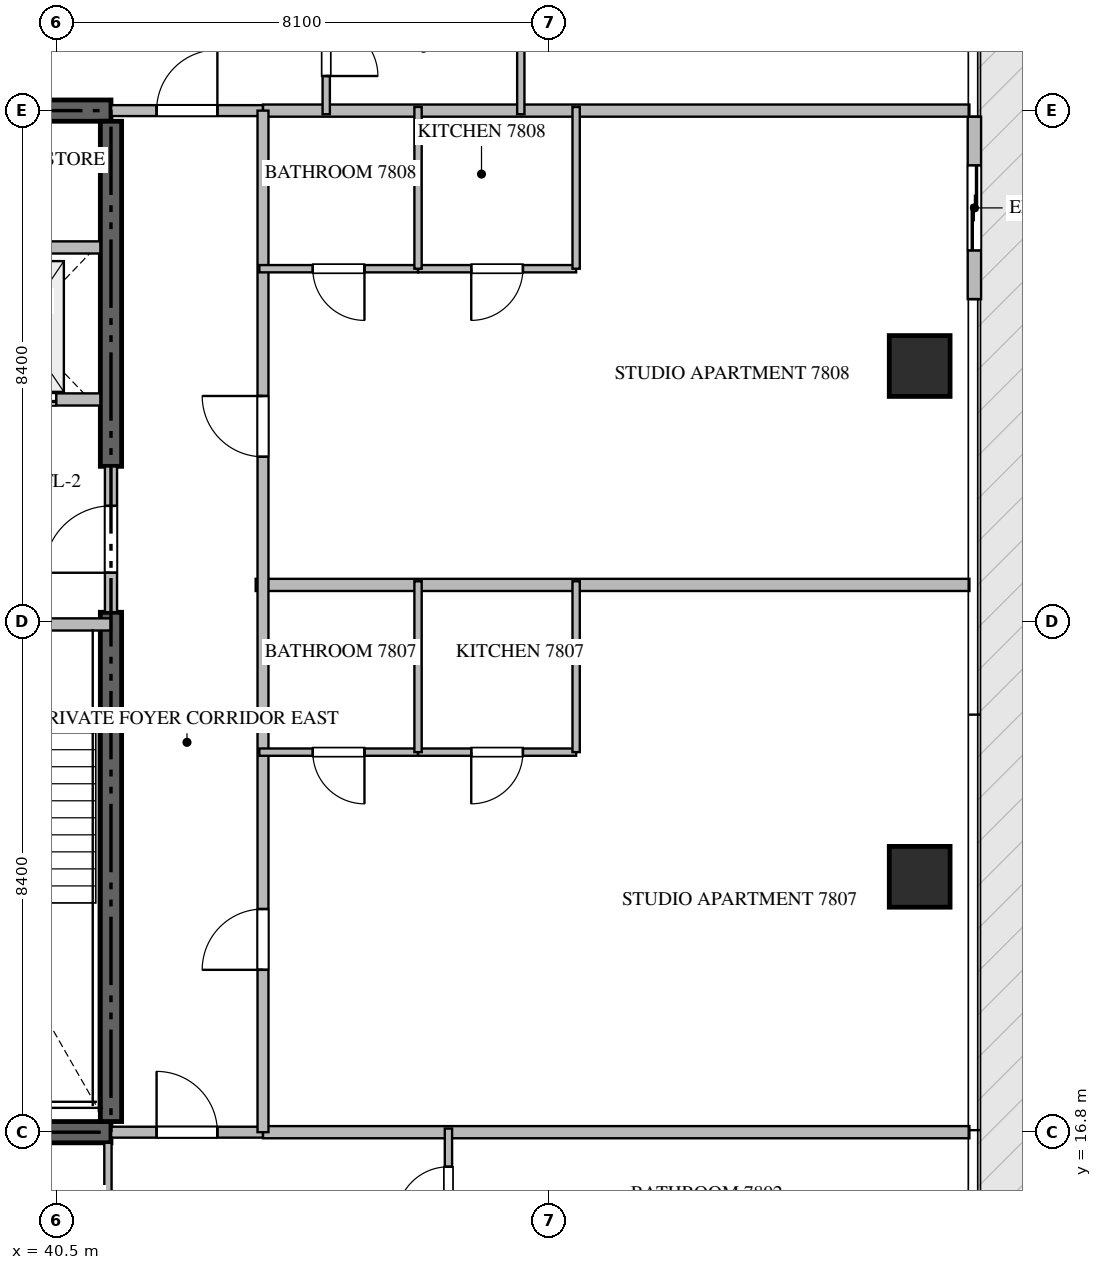
"""IFC4 building model, lengths in metres.
Left out: names, types, materials, properties, quantities, classifications, styles, units other than length and angle.
Written with IfcOpenShell. Run it as: python <this file> out.ifc"""

import sys

from ifc_helpers import new_model, si_unit, direction, frame, frame_2d, origin, origin_2d, place, context, subcontext, project, spatial, rectangle, extrude, source, transform, mapped, element, fill, save


model = new_model("IFC4")
c1 = context("Model", 3, precision=1e-05, world=origin(), true_north=direction((0.0, 1.0)))
c2 = subcontext(c1, "Body", "Model", "MODEL_VIEW")
j1 = project(units=[si_unit("LENGTHUNIT", "METRE"), si_unit("PLANEANGLEUNIT", "RADIAN")], contexts=[c1])
p1 = place(None, origin())
s1 = spatial("IfcSite", under=j1, at=p1, CompositionType="ELEMENT")
p2 = place(p1, origin())
s2 = spatial("IfcBuilding", under=s1, at=p2, CompositionType="ELEMENT")
p3 = place(p2, frame((0.0, 0.0, 313.7)))
s3 = spatial("IfcBuildingStorey", under=s2, at=p3, CompositionType="ELEMENT", Elevation=313.7)
for number, where, z_axis, x_axis in (
    (1, (23.4, 16.8, -0.26), (0.0, 0.0, 1.0), (1.0, 0.0, 0.0)),
    (2, (41.4, 33.6, -0.26), (0.0, 0.0, 1.0), (-1.0, 0.0, 0.0)),
):
    element("IfcWall", number, at=place(p3, frame(where, z_axis=z_axis, x_axis=x_axis)), inside=s3, PredefinedType="SHEAR", context=c2, shape_type="SweptSolid", body=[
        extrude(rectangle(XDim=18.0, YDim=0.35, at=frame_2d((9.0, 0.0))), origin(), (0.0, 0.0, 1.0), 4.048),
    ])
p4 = place(p3, frame((41.4, 16.975, -0.26), z_axis=(0.0, 0.0, 1.0), x_axis=(0.0, 1.0, 0.0)))
e3 = element("IfcWall", 3, at=p4, inside=s3, PredefinedType="SHEAR", context=c2, shape_type="SweptSolid", body=[
    extrude(rectangle(XDim=8.375, YDim=0.35, at=frame_2d((4.188, 0.0))), origin(), (0.0, 0.0, 1.0), 4.048),
])
p5 = place(p3, frame((41.4, 27.75, -0.26), z_axis=(0.0, 0.0, 1.0), x_axis=(0.0, 1.0, 0.0)))
e4 = element("IfcWall", 4, at=p5, inside=s3, PredefinedType="SHEAR", context=c2, shape_type="SweptSolid", body=[
    extrude(rectangle(XDim=5.675, YDim=0.35, at=frame_2d((2.837, 0.0))), origin(), (0.0, 0.0, 1.0), 4.048),
])
m1 = source(origin(), c2, "Body", "SweptSolid", [
    extrude(rectangle(XDim=1.0, YDim=1.0, at=origin_2d()), origin(), (0.0, 0.0, 1.0), 4.05),
])
for number, where, z_axis, x_axis in (
    (5, (54.7, 21.0, -0.26), (0.0, 0.0, 1.0), (1.0, 0.0, 0.0)),
    (6, (54.7, 29.4, -0.26), (0.0, 0.0, 1.0), (1.0, 0.0, 0.0)),
):
    element("IfcColumn", number, at=place(p3, frame(where, z_axis=z_axis, x_axis=x_axis)), inside=s3, PredefinedType="COLUMN", context=c2, shape_type="MappedRepresentation", body=[
        mapped(m1, transform((0.0, 0.0, 0.0), scale=1.0)),
    ])
p6 = place(p3, frame((55.6, 30.5, 0.0), z_axis=(0.0, 0.0, 1.0), x_axis=(0.0, 1.0, 0.0)))
e7 = element("IfcWall", 7, at=p6, inside=s3, PredefinedType="ELEMENTEDWALL", context=c2, shape_type="SweptSolid", body=[
    extrude(rectangle(XDim=3.0, YDim=0.22, at=frame_2d((1.5, 0.0))), origin(), (0.0, 0.0, 1.0), 3.775),
])
p7 = place(p6, frame((0.8, 0.0, 0.0)))
e8 = element("IfcOpeningElement", 8, at=p7, cuts=e7, PredefinedType="OPENING", context=c2, shape_type="SweptSolid", body=[
    extrude(rectangle(XDim=1.4, YDim=2.25, at=frame_2d((0.7, 1.125))), frame((0.0, 0.12, 0.0), z_axis=(0.0, -1.0, 0.0), x_axis=(1.0, 0.0, 0.0)), (0.0, 0.0, 1.0), 0.24),
])
p8 = place(p3, frame((36.95, 25.15, 0.0), z_axis=(0.0, 0.0, 1.0), x_axis=(1.0, 0.0, 0.0)))
e9 = element("IfcWall", 9, at=p8, inside=s3, PredefinedType="STANDARD", context=c2, shape_type="SweptSolid", body=[
    extrude(rectangle(XDim=4.45, YDim=0.2, at=frame_2d((2.225, 0.0))), origin(), (0.0, 0.0, 1.0), 3.79),
])
p9 = place(p8, frame((1.65, 0.0, 0.0)))
e10 = element("IfcOpeningElement", 10, at=p9, cuts=e9, PredefinedType="OPENING", context=c2, shape_type="SweptSolid", body=[
    extrude(rectangle(XDim=1.1, YDim=2.15, at=frame_2d((0.55, 1.075))), frame((0.0, 0.11, 0.0), z_axis=(0.0, -1.0, 0.0), x_axis=(1.0, 0.0, 0.0)), (0.0, 0.0, 1.0), 0.22),
])
p10 = place(p3, frame((38.75, 28.85, 0.0), z_axis=(0.0, 0.0, 1.0), x_axis=(1.0, 0.0, 0.0)))
e11 = element("IfcWall", 11, at=p10, inside=s3, PredefinedType="STANDARD", context=c2, shape_type="SweptSolid", body=[
    extrude(rectangle(XDim=2.475, YDim=0.2, at=frame_2d((1.238, 0.0))), origin(), (0.0, 0.0, 1.0), 3.79),
])
p11 = place(p10, frame((0.55, 0.0, 0.0)))
e12 = element("IfcOpeningElement", 12, at=p11, cuts=e11, PredefinedType="OPENING", context=c2, shape_type="SweptSolid", body=[
    extrude(rectangle(XDim=1.2, YDim=2.2, at=frame_2d((0.6, 1.1))), frame((0.0, 0.11, 0.0), z_axis=(0.0, -1.0, 0.0), x_axis=(1.0, 0.0, 0.0)), (0.0, 0.0, 1.0), 0.22),
])
p12 = place(p3, frame((38.75, 31.35, 0.0), z_axis=(0.0, 0.0, 1.0), x_axis=(1.0, 0.0, 0.0)))
e13 = element("IfcWall", 13, at=p12, inside=s3, PredefinedType="STANDARD", context=c2, shape_type="SweptSolid", body=[
    extrude(rectangle(XDim=2.475, YDim=0.2, at=frame_2d((1.238, 0.0))), origin(), (0.0, 0.0, 1.0), 3.79),
])
p13 = place(p3, frame((41.4, 25.352, 0.0), z_axis=(0.0, 0.0, 1.0), x_axis=(0.0, 1.0, 0.0)))
e14 = element("IfcWall", 14, at=p13, inside=s3, PredefinedType="STANDARD", context=c2, shape_type="SweptSolid", body=[
    extrude(rectangle(XDim=2.396, YDim=0.2, at=frame_2d((1.198, 0.0))), origin(), (0.0, 0.0, 1.0), 3.79),
])
p14 = place(p13, frame((0.648, 0.0, 0.0)))
e15 = element("IfcOpeningElement", 15, at=p14, cuts=e14, PredefinedType="OPENING", context=c2, shape_type="SweptSolid", body=[
    extrude(rectangle(XDim=1.1, YDim=2.15, at=frame_2d((0.55, 1.075))), frame((0.0, 0.11, 0.0), z_axis=(0.0, -1.0, 0.0), x_axis=(1.0, 0.0, 0.0)), (0.0, 0.0, 1.0), 0.22),
])
p15 = place(p3, frame((43.78, 25.8, 0.0), z_axis=(0.0, 0.0, 1.0), x_axis=(1.0, 0.0, 0.0)))
e16 = element("IfcWall", 16, at=p15, inside=s3, PredefinedType="PARTITIONING", context=c2, shape_type="SweptSolid", body=[
    extrude(rectangle(XDim=11.738, YDim=0.2, at=frame_2d((5.869, 0.0))), origin(), (0.0, 0.0, 1.0), 3.79),
])
for number, where, z_axis, x_axis in (
    (17, (43.9, 16.8, 0.0), (0.0, 0.0, 1.0), (1.0, 0.0, 0.0)),
    (18, (43.9, 33.6, 0.0), (0.0, 0.0, 1.0), (1.0, 0.0, 0.0)),
):
    element("IfcWall", number, at=place(p3, frame(where, z_axis=z_axis, x_axis=x_axis)), inside=s3, PredefinedType="PARTITIONING", context=c2, shape_type="SweptSolid", body=[
        extrude(rectangle(XDim=11.618, YDim=0.2, at=frame_2d((5.809, 0.0))), origin(), (0.0, 0.0, 1.0), 3.79),
    ])
p16 = place(p3, frame((41.402, 16.8, 0.0), z_axis=(0.0, 0.0, 1.0), x_axis=(1.0, 0.0, 0.0)))
e19 = element("IfcWall", 19, at=p16, inside=s3, PredefinedType="PARTITIONING", context=c2, shape_type="SweptSolid", body=[
    extrude(rectangle(XDim=2.496, YDim=0.18, at=frame_2d((1.248, 0.0))), origin(), (0.0, 0.0, 1.0), 3.79),
])
p17 = place(p16, frame((0.748, 0.0, 0.0)))
e20 = element("IfcOpeningElement", 20, at=p17, cuts=e19, PredefinedType="OPENING", context=c2, shape_type="SweptSolid", body=[
    extrude(rectangle(XDim=1.0, YDim=2.15, at=frame_2d((0.5, 1.075))), frame((0.0, 0.1, 0.0), z_axis=(0.0, -1.0, 0.0), x_axis=(1.0, 0.0, 0.0)), (0.0, 0.0, 1.0), 0.2),
])
p18 = place(p3, frame((41.402, 33.6, 0.0), z_axis=(0.0, 0.0, 1.0), x_axis=(1.0, 0.0, 0.0)))
e21 = element("IfcWall", 21, at=p18, inside=s3, PredefinedType="PARTITIONING", context=c2, shape_type="SweptSolid", body=[
    extrude(rectangle(XDim=2.496, YDim=0.18, at=frame_2d((1.248, 0.0))), origin(), (0.0, 0.0, 1.0), 3.79),
])
p19 = place(p18, frame((0.748, 0.0, 0.0)))
e22 = element("IfcOpeningElement", 22, at=p19, cuts=e21, PredefinedType="OPENING", context=c2, shape_type="SweptSolid", body=[
    extrude(rectangle(XDim=1.0, YDim=2.15, at=frame_2d((0.5, 1.075))), frame((0.0, 0.1, 0.0), z_axis=(0.0, -1.0, 0.0), x_axis=(1.0, 0.0, 0.0)), (0.0, 0.0, 1.0), 0.2),
])
p20 = place(p3, frame((43.9, 16.8, 0.0), z_axis=(0.0, 0.0, 1.0), x_axis=(0.0, 1.0, 0.0)))
e23 = element("IfcWall", 23, at=p20, inside=s3, PredefinedType="PARTITIONING", context=c2, shape_type="SweptSolid", body=[
    extrude(rectangle(XDim=16.8, YDim=0.18, at=frame_2d((8.4, 0.0))), origin(), (0.0, 0.0, 1.0), 3.79),
])
p21 = place(p20, frame((2.67, 0.0, 0.0)))
e24 = element("IfcOpeningElement", 24, at=p21, cuts=e23, PredefinedType="OPENING", context=c2, shape_type="SweptSolid", body=[
    extrude(rectangle(XDim=1.0, YDim=2.15, at=frame_2d((0.5, 1.075))), frame((0.0, 0.1, 0.0), z_axis=(0.0, -1.0, 0.0), x_axis=(1.0, 0.0, 0.0)), (0.0, 0.0, 1.0), 0.2),
])
p22 = place(p20, frame((11.107, 0.0, 0.0)))
e25 = element("IfcOpeningElement", 25, at=p22, cuts=e23, PredefinedType="OPENING", context=c2, shape_type="SweptSolid", body=[
    extrude(rectangle(XDim=1.0, YDim=2.15, at=frame_2d((0.5, 1.075))), frame((0.0, 0.1, 0.0), z_axis=(0.0, -1.0, 0.0), x_axis=(1.0, 0.0, 0.0)), (0.0, 0.0, 1.0), 0.2),
])
p23 = place(p3, frame((41.35, 14.05, 0.0), z_axis=(0.0, 0.0, 1.0), x_axis=(0.0, 1.0, 0.0)))
e26 = element("IfcWall", 26, at=p23, inside=s3, PredefinedType="PARTITIONING", context=c2, shape_type="SweptSolid", body=[
    extrude(rectangle(XDim=2.575, YDim=0.12, at=frame_2d((1.288, 0.0))), origin(), (0.0, 0.0, 1.0), 3.79),
])
p24 = place(p3, frame((46.95, 14.752, 0.0), z_axis=(0.0, 0.0, 1.0), x_axis=(0.0, 1.0, 0.0)))
e27 = element("IfcWall", 27, at=p24, inside=s3, PredefinedType="PARTITIONING", context=c2, shape_type="SweptSolid", body=[
    extrude(rectangle(XDim=2.108, YDim=0.12, at=frame_2d((1.054, 0.0))), origin(), (0.0, 0.0, 1.0), 3.372),
])
p25 = place(p24, frame((0.629, 0.0, 0.0)))
e28 = element("IfcOpeningElement", 28, at=p25, cuts=e27, PredefinedType="OPENING", context=c2, shape_type="SweptSolid", body=[
    extrude(rectangle(XDim=0.85, YDim=2.1, at=frame_2d((0.425, 1.05))), frame((0.0, 0.07, 0.0), z_axis=(0.0, -1.0, 0.0), x_axis=(1.0, 0.0, 0.0)), (0.0, 0.0, 1.0), 0.14),
])
p26 = place(p3, frame((48.14, 35.65, 0.0), z_axis=(0.0, 0.0, 1.0), x_axis=(0.0, -1.0, 0.0)))
e29 = element("IfcWall", 29, at=p26, inside=s3, PredefinedType="PARTITIONING", context=c2, shape_type="SweptSolid", body=[
    extrude(rectangle(XDim=2.11, YDim=0.12, at=frame_2d((1.055, 0.0))), origin(), (0.0, 0.0, 1.0), 3.79),
])
p27 = place(p3, frame((44.94, 35.648, 0.0), z_axis=(0.0, 0.0, 1.0), x_axis=(0.0, -1.0, 0.0)))
e30 = element("IfcWall", 30, at=p27, inside=s3, PredefinedType="PARTITIONING", context=c2, shape_type="SweptSolid", body=[
    extrude(rectangle(XDim=2.108, YDim=0.12, at=frame_2d((1.054, 0.0))), origin(), (0.0, 0.0, 1.0), 3.79),
])
p28 = place(p27, frame((0.629, 0.0, 0.0)))
e31 = element("IfcOpeningElement", 31, at=p28, cuts=e30, PredefinedType="OPENING", context=c2, shape_type="SweptSolid", body=[
    extrude(rectangle(XDim=0.85, YDim=2.1, at=frame_2d((0.425, 1.05))), frame((0.0, 0.07, 0.0), z_axis=(0.0, -1.0, 0.0), x_axis=(1.0, 0.0, 0.0)), (0.0, 0.0, 1.0), 0.14),
])
p29 = place(p3, frame((49.05, 23.05, 0.0), z_axis=(0.0, 0.0, 1.0), x_axis=(-1.0, 0.0, 0.0)))
e32 = element("IfcWall", 32, at=p29, inside=s3, PredefinedType="PARTITIONING", context=c2, shape_type="SweptSolid", body=[
    extrude(rectangle(XDim=2.6, YDim=0.12, at=frame_2d((1.3, 0.0))), origin(), (0.0, 0.0, 1.0), 3.79),
])
p30 = place(p29, frame((0.875, 0.0, 0.0)))
e33 = element("IfcOpeningElement", 33, at=p30, cuts=e32, PredefinedType="OPENING", context=c2, shape_type="SweptSolid", body=[
    extrude(rectangle(XDim=0.85, YDim=2.1, at=frame_2d((0.425, 1.05))), frame((0.0, 0.07, 0.0), z_axis=(0.0, -1.0, 0.0), x_axis=(1.0, 0.0, 0.0)), (0.0, 0.0, 1.0), 0.14),
])
p31 = place(p3, frame((46.448, 23.05, 0.0), z_axis=(0.0, 0.0, 1.0), x_axis=(-1.0, 0.0, 0.0)))
e34 = element("IfcWall", 34, at=p31, inside=s3, PredefinedType="PARTITIONING", context=c2, shape_type="SweptSolid", body=[
    extrude(rectangle(XDim=2.608, YDim=0.12, at=frame_2d((1.304, 0.0))), origin(), (0.0, 0.0, 1.0), 3.79),
])
p32 = place(p31, frame((0.879, 0.0, 0.0)))
e35 = element("IfcOpeningElement", 35, at=p32, cuts=e34, PredefinedType="OPENING", context=c2, shape_type="SweptSolid", body=[
    extrude(rectangle(XDim=0.85, YDim=2.1, at=frame_2d((0.425, 1.05))), frame((0.0, 0.07, 0.0), z_axis=(0.0, -1.0, 0.0), x_axis=(1.0, 0.0, 0.0)), (0.0, 0.0, 1.0), 0.14),
])
for number, where, z_axis, x_axis in (
    (36, (46.45, 23.05, 0.0), (0.0, 0.0, 1.0), (0.0, 1.0, 0.0)),
    (37, (49.05, 23.05, 0.0), (0.0, 0.0, 1.0), (0.0, 1.0, 0.0)),
):
    element("IfcWall", number, at=place(p3, frame(where, z_axis=z_axis, x_axis=x_axis)), inside=s3, PredefinedType="PARTITIONING", context=c2, shape_type="SweptSolid", body=[
        extrude(rectangle(XDim=2.81, YDim=0.12, at=frame_2d((1.405, 0.0))), origin(), (0.0, 0.0, 1.0), 3.79),
    ])
p33 = place(p3, frame((49.05, 31.0, 0.0), z_axis=(0.0, 0.0, 1.0), x_axis=(-1.0, 0.0, 0.0)))
e38 = element("IfcWall", 38, at=p33, inside=s3, PredefinedType="PARTITIONING", context=c2, shape_type="SweptSolid", body=[
    extrude(rectangle(XDim=2.6, YDim=0.12, at=frame_2d((1.3, 0.0))), origin(), (0.0, 0.0, 1.0), 3.79),
])
p34 = place(p33, frame((0.875, 0.0, 0.0)))
e39 = element("IfcOpeningElement", 39, at=p34, cuts=e38, PredefinedType="OPENING", context=c2, shape_type="SweptSolid", body=[
    extrude(rectangle(XDim=0.85, YDim=2.1, at=frame_2d((0.425, 1.05))), frame((0.0, 0.07, 0.0), z_axis=(0.0, -1.0, 0.0), x_axis=(1.0, 0.0, 0.0)), (0.0, 0.0, 1.0), 0.14),
])
p35 = place(p3, frame((46.448, 31.0, 0.0), z_axis=(0.0, 0.0, 1.0), x_axis=(-1.0, 0.0, 0.0)))
e40 = element("IfcWall", 40, at=p35, inside=s3, PredefinedType="PARTITIONING", context=c2, shape_type="SweptSolid", body=[
    extrude(rectangle(XDim=2.608, YDim=0.12, at=frame_2d((1.304, 0.0))), origin(), (0.0, 0.0, 1.0), 3.79),
])
p36 = place(p35, frame((0.879, 0.0, 0.0)))
e41 = element("IfcOpeningElement", 41, at=p36, cuts=e40, PredefinedType="OPENING", context=c2, shape_type="SweptSolid", body=[
    extrude(rectangle(XDim=0.85, YDim=2.1, at=frame_2d((0.425, 1.05))), frame((0.0, 0.07, 0.0), z_axis=(0.0, -1.0, 0.0), x_axis=(1.0, 0.0, 0.0)), (0.0, 0.0, 1.0), 0.14),
])
for number, where, z_axis, x_axis in (
    (42, (46.45, 31.0, 0.0), (0.0, 0.0, 1.0), (0.0, 1.0, 0.0)),
    (43, (49.05, 31.0, 0.0), (0.0, 0.0, 1.0), (0.0, 1.0, 0.0)),
):
    element("IfcWall", number, at=place(p3, frame(where, z_axis=z_axis, x_axis=x_axis)), inside=s3, PredefinedType="PARTITIONING", context=c2, shape_type="SweptSolid", body=[
        extrude(rectangle(XDim=2.66, YDim=0.12, at=frame_2d((1.33, 0.0))), origin(), (0.0, 0.0, 1.0), 3.79),
    ])
m2 = source(origin(), c2, "Body", "SweptSolid", [
    extrude(rectangle(XDim=1.4, YDim=2.25, at=frame_2d((0.7, 1.125))), frame((0.0, 0.025, 0.0), z_axis=(0.0, -1.0, 0.0), x_axis=(1.0, 0.0, 0.0)), (0.0, 0.0, 1.0), 0.05),
])
p37 = place(p7, origin())
e44 = element("IfcDoor", 44, at=p37, inside=s3, OperationType="SLIDING_TO_LEFT", PredefinedType="DOOR", context=c2, shape_type="MappedRepresentation", body=[
    mapped(m2, transform((0.0, 0.0, 0.0), scale=1.0)),
])
fill(e8, e44)
m3 = source(origin(), c2, "Body", "SweptSolid", [
    extrude(rectangle(XDim=1.2, YDim=2.2, at=frame_2d((0.6, 1.1))), frame((0.0, 0.025, 0.0), z_axis=(0.0, -1.0, 0.0), x_axis=(1.0, 0.0, 0.0)), (0.0, 0.0, 1.0), 0.05),
])
p38 = place(p11, origin())
e45 = element("IfcDoor", 45, at=p38, inside=s3, OperationType="DOUBLE_DOOR_SLIDING", PredefinedType="DOOR", context=c2, shape_type="MappedRepresentation", body=[
    mapped(m3, transform((0.0, 0.0, 0.0), scale=1.0)),
])
fill(e12, e45)
m4 = source(origin(), c2, "Body", "SweptSolid", [
    extrude(rectangle(XDim=1.1, YDim=2.15, at=frame_2d((0.55, 1.075))), frame((0.0, 0.025, 0.0), z_axis=(0.0, -1.0, 0.0), x_axis=(1.0, 0.0, 0.0)), (0.0, 0.0, 1.0), 0.05),
])
p39 = place(p14, origin())
e46 = element("IfcDoor", 46, at=p39, inside=s3, OperationType="SINGLE_SWING_LEFT", PredefinedType="DOOR", context=c2, shape_type="MappedRepresentation", body=[
    mapped(m4, transform((0.0, 0.0, 0.0), scale=1.0)),
])
fill(e15, e46)
m5 = source(origin(), c2, "Body", "SweptSolid", [
    extrude(rectangle(XDim=1.0, YDim=2.15, at=frame_2d((0.5, 1.075))), frame((0.0, 0.025, 0.0), z_axis=(0.0, -1.0, 0.0), x_axis=(1.0, 0.0, 0.0)), (0.0, 0.0, 1.0), 0.05),
])
p40 = place(p17, origin())
e47 = element("IfcDoor", 47, at=p40, inside=s3, OperationType="SINGLE_SWING_LEFT", PredefinedType="DOOR", context=c2, shape_type="MappedRepresentation", body=[
    mapped(m5, transform((0.0, 0.0, 0.0), scale=1.0)),
])
fill(e20, e47)
p41 = place(p19, origin())
e48 = element("IfcDoor", 48, at=p41, inside=s3, OperationType="SINGLE_SWING_RIGHT", PredefinedType="DOOR", context=c2, shape_type="MappedRepresentation", body=[
    mapped(m5, transform((0.0, 0.0, 0.0), scale=1.0)),
])
fill(e22, e48)
p42 = place(p21, origin())
e49 = element("IfcDoor", 49, at=p42, inside=s3, OperationType="SINGLE_SWING_LEFT", PredefinedType="DOOR", context=c2, shape_type="MappedRepresentation", body=[
    mapped(m5, transform((0.0, 0.0, 0.0), scale=1.0)),
])
fill(e24, e49)
p43 = place(p22, origin())
e50 = element("IfcDoor", 50, at=p43, inside=s3, OperationType="SINGLE_SWING_RIGHT", PredefinedType="DOOR", context=c2, shape_type="MappedRepresentation", body=[
    mapped(m5, transform((0.0, 0.0, 0.0), scale=1.0)),
])
fill(e25, e50)
m6 = source(origin(), c2, "Body", "SweptSolid", [
    extrude(rectangle(XDim=0.85, YDim=2.1, at=frame_2d((0.425, 1.05))), frame((0.0, 0.025, 0.0), z_axis=(0.0, -1.0, 0.0), x_axis=(1.0, 0.0, 0.0)), (0.0, 0.0, 1.0), 0.05),
])
p44 = place(p25, origin())
e51 = element("IfcDoor", 51, at=p44, inside=s3, OperationType="SINGLE_SWING_LEFT", PredefinedType="DOOR", context=c2, shape_type="MappedRepresentation", body=[
    mapped(m6, transform((0.0, 0.0, 0.0), scale=1.0)),
])
fill(e28, e51)
p45 = place(p28, origin())
e52 = element("IfcDoor", 52, at=p45, inside=s3, OperationType="SINGLE_SWING_RIGHT", PredefinedType="DOOR", context=c2, shape_type="MappedRepresentation", body=[
    mapped(m6, transform((0.0, 0.0, 0.0), scale=1.0)),
])
fill(e31, e52)
p46 = place(p30, origin())
e53 = element("IfcDoor", 53, at=p46, inside=s3, OperationType="SINGLE_SWING_RIGHT", PredefinedType="DOOR", context=c2, shape_type="MappedRepresentation", body=[
    mapped(m6, transform((0.0, 0.0, 0.0), scale=1.0)),
])
fill(e33, e53)
p47 = place(p32, origin())
e54 = element("IfcDoor", 54, at=p47, inside=s3, OperationType="SINGLE_SWING_LEFT", PredefinedType="DOOR", context=c2, shape_type="MappedRepresentation", body=[
    mapped(m6, transform((0.0, 0.0, 0.0), scale=1.0)),
])
fill(e35, e54)
p48 = place(p34, origin())
e55 = element("IfcDoor", 55, at=p48, inside=s3, OperationType="SINGLE_SWING_RIGHT", PredefinedType="DOOR", context=c2, shape_type="MappedRepresentation", body=[
    mapped(m6, transform((0.0, 0.0, 0.0), scale=1.0)),
])
fill(e39, e55)
p49 = place(p36, origin())
e56 = element("IfcDoor", 56, at=p49, inside=s3, OperationType="SINGLE_SWING_LEFT", PredefinedType="DOOR", context=c2, shape_type="MappedRepresentation", body=[
    mapped(m6, transform((0.0, 0.0, 0.0), scale=1.0)),
])
fill(e41, e56)
save(model, sys.argv[1])
